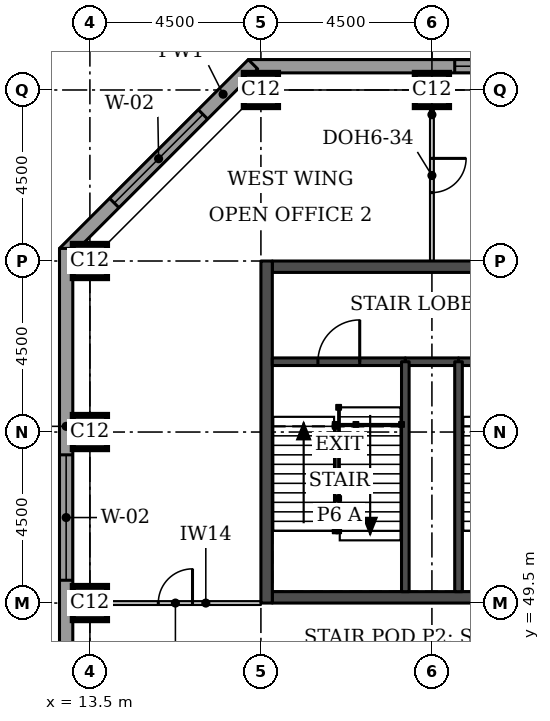
"""IFC4 building model, lengths in metres.
Left out: names, types, materials, properties, quantities, classifications, styles, units other than length and angle.
Written with IfcOpenShell. Run it as: python <this file> out.ifc"""

import sys

from ifc_helpers import new_model, si_unit, direction, frame, frame_2d, origin, origin_2d, place, context, subcontext, project, spatial, rectangle, extrude, element, fill, save


model = new_model("IFC4")
c1 = context("Model", 3, precision=1e-05, world=origin(), true_north=direction((0.0, 1.0)))
c2 = subcontext(c1, "Body", "Model", "MODEL_VIEW")
j1 = project(units=[si_unit("LENGTHUNIT", "METRE"), si_unit("PLANEANGLEUNIT", "RADIAN")], contexts=[c1])
p1 = place(None, origin())
s1 = spatial("IfcSite", under=j1, at=p1, CompositionType="ELEMENT")
p2 = place(p1, origin())
s2 = spatial("IfcBuilding", under=s1, at=p2, CompositionType="ELEMENT")
p3 = place(p2, frame((0.0, 0.0, 188.4)))
s3 = spatial("IfcBuildingStorey", under=s2, at=p3, CompositionType="ELEMENT", Elevation=188.4)
for number, where, z_axis, x_axis in (
    (1, (13.5, 49.5, 0.0), (0.0, 0.0, 1.0), (1.0, 0.0, 0.0)),
    (2, (13.5, 54.0, 0.0), (0.0, 0.0, 1.0), (1.0, 0.0, 0.0)),
    (3, (13.5, 58.5, 0.0), (0.0, 0.0, 1.0), (1.0, 0.0, 0.0)),
    (4, (18.0, 63.0, 0.0), (0.0, 0.0, 1.0), (1.0, 0.0, 0.0)),
    (5, (22.5, 63.0, 0.0), (0.0, 0.0, 1.0), (1.0, 0.0, 0.0)),
):
    element("IfcColumn", number, at=place(p3, frame(where, z_axis=z_axis, x_axis=x_axis)), inside=s3, PredefinedType="COLUMN", context=c2, shape_type="SweptSolid", body=[
        extrude(rectangle(XDim=0.9, YDim=0.9, at=origin_2d()), origin(), (0.0, 0.0, 1.0), 3.7),
    ])
for number, where, z_axis, x_axis in (
    (6, (18.3, 49.65, 0.0), (0.0, 0.0, 1.0), (1.0, 0.0, 0.0)),
    (7, (18.3, 58.35, 0.0), (0.0, 0.0, 1.0), (1.0, 0.0, 0.0)),
):
    element("IfcWall", number, at=place(p3, frame(where, z_axis=z_axis, x_axis=x_axis)), inside=s3, PredefinedType="SHEAR", context=c2, shape_type="SweptSolid", body=[
        extrude(rectangle(XDim=8.4, YDim=0.3, at=frame_2d((4.2, 0.0))), origin(), (0.0, 0.0, 1.0), 3.7),
    ])
p4 = place(p3, frame((18.15, 49.5, 0.0), z_axis=(0.0, 0.0, 1.0), x_axis=(0.0, 1.0, 0.0)))
e8 = element("IfcWall", 8, at=p4, inside=s3, PredefinedType="SHEAR", context=c2, shape_type="SweptSolid", body=[
    extrude(rectangle(XDim=9.0, YDim=0.3, at=frame_2d((4.5, 0.0))), origin(), (0.0, 0.0, 1.0), 3.7),
])
p5 = place(p3, frame((35.55, 63.625, 0.0), z_axis=(0.0, 0.0, 1.0), x_axis=(-1.0, 0.0, 0.0)))
e9 = element("IfcWall", 9, at=p5, inside=s3, PredefinedType="STANDARD", context=c2, shape_type="SweptSolid", body=[
    extrude(rectangle(XDim=17.881, YDim=0.35, at=frame_2d((8.941, 0.0))), origin(), (0.0, 0.0, 1.0), 3.525),
])
p6 = place(p5, frame((0.5, 0.0, 0.9)))
e10 = element("IfcOpeningElement", 10, at=p6, cuts=e9, PredefinedType="OPENING", context=c2, shape_type="SweptSolid", body=[
    extrude(rectangle(XDim=3.3, YDim=1.9, at=frame_2d((1.65, 0.95))), frame((0.0, 0.185, 0.0), z_axis=(0.0, -1.0, 0.0), x_axis=(1.0, 0.0, 0.0)), (0.0, 0.0, 1.0), 0.37),
])
p7 = place(p5, frame((9.15, 0.0, 0.9)))
e11 = element("IfcOpeningElement", 11, at=p7, cuts=e9, PredefinedType="OPENING", context=c2, shape_type="SweptSolid", body=[
    extrude(rectangle(XDim=3.3, YDim=1.9, at=frame_2d((1.65, 0.95))), frame((0.0, 0.185, 0.0), z_axis=(0.0, -1.0, 0.0), x_axis=(1.0, 0.0, 0.0)), (0.0, 0.0, 1.0), 0.37),
])
p8 = place(p3, frame((17.792, 63.676, 0.0), z_axis=(0.0, 0.0, 1.0), x_axis=(-0.707106781187, -0.707106781187, 0.0)))
e12 = element("IfcWall", 12, at=p8, inside=s3, PredefinedType="STANDARD", context=c2, shape_type="SweptSolid", body=[
    extrude(rectangle(XDim=7.027, YDim=0.35, at=frame_2d((3.513, 0.0))), origin(), (0.0, 0.0, 1.0), 3.525),
])
p9 = place(p8, frame((1.863, 0.0, 0.9)))
e13 = element("IfcOpeningElement", 13, at=p9, cuts=e12, PredefinedType="OPENING", context=c2, shape_type="SweptSolid", body=[
    extrude(rectangle(XDim=3.3, YDim=1.9, at=frame_2d((1.65, 0.95))), frame((0.0, 0.185, 0.0), z_axis=(0.0, -1.0, 0.0), x_axis=(1.0, 0.0, 0.0)), (0.0, 0.0, 1.0), 0.37),
])
p10 = place(p3, frame((12.875, 58.831, 0.0), z_axis=(0.0, 0.0, 1.0), x_axis=(0.0, -1.0, 0.0)))
e14 = element("IfcWall", 14, at=p10, inside=s3, PredefinedType="STANDARD", context=c2, shape_type="SweptSolid", body=[
    extrude(rectangle(XDim=14.163, YDim=0.35, at=frame_2d((7.081, 0.0))), origin(), (0.0, 0.0, 1.0), 3.525),
])
p11 = place(p10, frame((5.431, 0.0, 0.9)))
e15 = element("IfcOpeningElement", 15, at=p11, cuts=e14, PredefinedType="OPENING", context=c2, shape_type="SweptSolid", body=[
    extrude(rectangle(XDim=3.3, YDim=1.9, at=frame_2d((1.65, 0.95))), frame((0.0, 0.185, 0.0), z_axis=(0.0, -1.0, 0.0), x_axis=(1.0, 0.0, 0.0)), (0.0, 0.0, 1.0), 0.37),
])
p12 = place(p3, frame((22.5, 63.0, 0.0), z_axis=(0.0, 0.0, 1.0), x_axis=(0.0, -1.0, 0.0)))
e16 = element("IfcWall", 16, at=p12, inside=s3, PredefinedType="PARTITIONING", context=c2, shape_type="SweptSolid", body=[
    extrude(rectangle(XDim=4.5, YDim=0.1, at=frame_2d((2.25, 0.0))), origin(), (0.0, 0.0, 1.0), 3.55),
])
p13 = place(p12, frame((1.8, 0.0, 0.0)))
e17 = element("IfcOpeningElement", 17, at=p13, cuts=e16, PredefinedType="OPENING", context=c2, shape_type="SweptSolid", body=[
    extrude(rectangle(XDim=0.9, YDim=2.1, at=frame_2d((0.45, 1.05))), frame((0.0, 0.06, 0.0), z_axis=(0.0, -1.0, 0.0), x_axis=(1.0, 0.0, 0.0)), (0.0, 0.0, 1.0), 0.12),
])
p14 = place(p3, frame((13.5, 49.5, 0.0), z_axis=(0.0, 0.0, 1.0), x_axis=(1.0, 0.0, 0.0)))
e18 = element("IfcWall", 18, at=p14, inside=s3, PredefinedType="PARTITIONING", context=c2, shape_type="SweptSolid", body=[
    extrude(rectangle(XDim=4.5, YDim=0.1, at=frame_2d((2.25, 0.0))), origin(), (0.0, 0.0, 1.0), 3.55),
])
p15 = place(p14, frame((1.8, 0.0, 0.0)))
e19 = element("IfcOpeningElement", 19, at=p15, cuts=e18, PredefinedType="OPENING", context=c2, shape_type="SweptSolid", body=[
    extrude(rectangle(XDim=0.9, YDim=2.1, at=frame_2d((0.45, 1.05))), frame((0.0, 0.06, 0.0), z_axis=(0.0, -1.0, 0.0), x_axis=(1.0, 0.0, 0.0)), (0.0, 0.0, 1.0), 0.12),
])
p16 = place(p3, frame((21.8, 55.85, 0.0), z_axis=(0.0, 0.0, 1.0), x_axis=(1.0, 0.0, 0.0)))
e20 = element("IfcWall", 20, at=p16, inside=s3, PredefinedType="SOLIDWALL", context=c2, shape_type="SweptSolid", body=[
    extrude(rectangle(XDim=1.4, YDim=0.2, at=frame_2d((0.7, 0.0))), origin(), (0.0, 0.0, 1.0), 3.55),
])
p17 = place(p3, frame((18.3, 55.85, 0.0), z_axis=(0.0, 0.0, 1.0), x_axis=(1.0, 0.0, 0.0)))
e21 = element("IfcWall", 21, at=p17, inside=s3, PredefinedType="SOLIDWALL", context=c2, shape_type="SweptSolid", body=[
    extrude(rectangle(XDim=3.5, YDim=0.2, at=frame_2d((1.75, 0.0))), origin(), (0.0, 0.0, 1.0), 3.55),
])
p18 = place(p17, frame((1.2, 0.0, 0.0)))
e22 = element("IfcOpeningElement", 22, at=p18, cuts=e21, PredefinedType="OPENING", context=c2, shape_type="SweptSolid", body=[
    extrude(rectangle(XDim=1.1, YDim=2.1, at=frame_2d((0.55, 1.05))), frame((0.0, 0.11, 0.0), z_axis=(0.0, -1.0, 0.0), x_axis=(1.0, 0.0, 0.0)), (0.0, 0.0, 1.0), 0.22),
])
p19 = place(p3, frame((23.2, 55.85, 0.0), z_axis=(0.0, 0.0, 1.0), x_axis=(1.0, 0.0, 0.0)))
e23 = element("IfcWall", 23, at=p19, inside=s3, PredefinedType="SOLIDWALL", context=c2, shape_type="SweptSolid", body=[
    extrude(rectangle(XDim=3.5, YDim=0.2, at=frame_2d((1.75, 0.0))), origin(), (0.0, 0.0, 1.0), 3.55),
])
p20 = place(p19, frame((1.2, 0.0, 0.0)))
e24 = element("IfcOpeningElement", 24, at=p20, cuts=e23, PredefinedType="OPENING", context=c2, shape_type="SweptSolid", body=[
    extrude(rectangle(XDim=1.1, YDim=2.1, at=frame_2d((0.55, 1.05))), frame((0.0, 0.11, 0.0), z_axis=(0.0, -1.0, 0.0), x_axis=(1.0, 0.0, 0.0)), (0.0, 0.0, 1.0), 0.22),
])
for number, where, z_axis, x_axis in (
    (25, (21.8, 49.8, 0.0), (0.0, 0.0, 1.0), (0.0, 1.0, 0.0)),
    (26, (23.2, 49.8, 0.0), (0.0, 0.0, 1.0), (0.0, 1.0, 0.0)),
):
    element("IfcWall", number, at=place(p3, frame(where, z_axis=z_axis, x_axis=x_axis)), inside=s3, PredefinedType="SOLIDWALL", context=c2, shape_type="SweptSolid", body=[
        extrude(rectangle(XDim=6.05, YDim=0.2, at=frame_2d((3.025, 0.0))), origin(), (0.0, 0.0, 1.0), 3.55),
    ])
p21 = place(p7, origin())
e27 = element("IfcWindow", 27, at=p21, inside=s3, PartitioningType="SINGLE_PANEL", PredefinedType="WINDOW", context=c2, shape_type="SweptSolid", body=[
    extrude(rectangle(XDim=3.3, YDim=1.9, at=frame_2d((1.65, 0.95))), frame((0.0, 0.085, 0.0), z_axis=(0.0, -1.0, 0.0), x_axis=(1.0, 0.0, 0.0)), (0.0, 0.0, 1.0), 0.06),
])
fill(e11, e27)
p22 = place(p9, origin())
e28 = element("IfcWindow", 28, at=p22, inside=s3, PartitioningType="SINGLE_PANEL", PredefinedType="WINDOW", context=c2, shape_type="SweptSolid", body=[
    extrude(rectangle(XDim=3.3, YDim=1.9, at=frame_2d((1.65, 0.95))), frame((0.0, 0.085, 0.0), z_axis=(0.0, -1.0, 0.0), x_axis=(1.0, 0.0, 0.0)), (0.0, 0.0, 1.0), 0.06),
])
fill(e13, e28)
p23 = place(p11, origin())
e29 = element("IfcWindow", 29, at=p23, inside=s3, PartitioningType="SINGLE_PANEL", PredefinedType="WINDOW", context=c2, shape_type="SweptSolid", body=[
    extrude(rectangle(XDim=3.3, YDim=1.9, at=frame_2d((1.65, 0.95))), frame((0.0, 0.085, 0.0), z_axis=(0.0, -1.0, 0.0), x_axis=(1.0, 0.0, 0.0)), (0.0, 0.0, 1.0), 0.06),
])
fill(e15, e29)
p24 = place(p13, origin())
e30 = element("IfcDoor", 30, at=p24, inside=s3, OperationType="SINGLE_SWING_LEFT", PredefinedType="DOOR", context=c2, shape_type="SweptSolid", body=[
    extrude(rectangle(XDim=0.9, YDim=2.1, at=frame_2d((0.45, 1.05))), frame((0.0, 0.025, 0.0), z_axis=(0.0, -1.0, 0.0), x_axis=(1.0, 0.0, 0.0)), (0.0, 0.0, 1.0), 0.05),
])
fill(e17, e30)
p25 = place(p15, origin())
e31 = element("IfcDoor", 31, at=p25, inside=s3, OperationType="SINGLE_SWING_RIGHT", PredefinedType="DOOR", context=c2, shape_type="SweptSolid", body=[
    extrude(rectangle(XDim=0.9, YDim=2.1, at=frame_2d((0.45, 1.05))), frame((0.0, 0.025, 0.0), z_axis=(0.0, -1.0, 0.0), x_axis=(1.0, 0.0, 0.0)), (0.0, 0.0, 1.0), 0.05),
])
fill(e19, e31)
p26 = place(p18, origin())
e32 = element("IfcDoor", 32, at=p26, inside=s3, OperationType="SINGLE_SWING_RIGHT", PredefinedType="DOOR", context=c2, shape_type="SweptSolid", body=[
    extrude(rectangle(XDim=1.1, YDim=2.1, at=frame_2d((0.55, 1.05))), frame((0.0, 0.025, 0.0), z_axis=(0.0, -1.0, 0.0), x_axis=(1.0, 0.0, 0.0)), (0.0, 0.0, 1.0), 0.05),
])
fill(e22, e32)
save(model, sys.argv[1])
